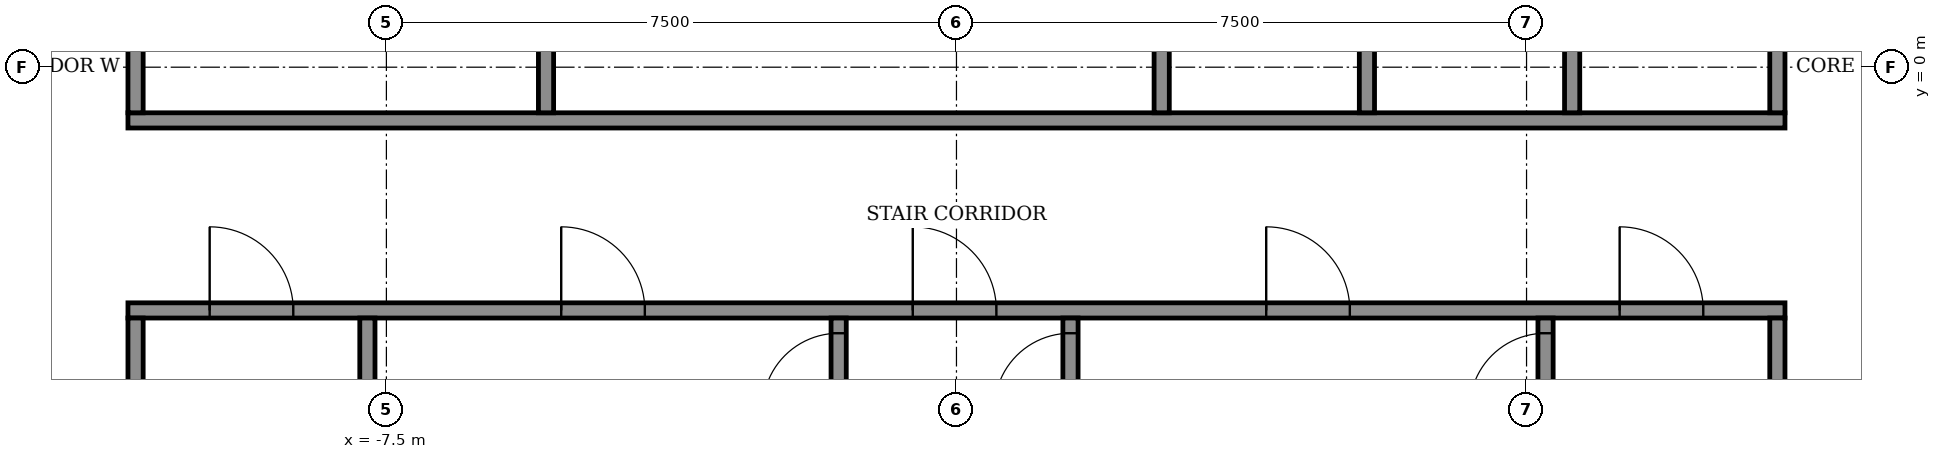
"""IFC4 building model, lengths in metres.
Left out: names, types, materials, properties, quantities, classifications, styles, units other than length and angle.
Written with IfcOpenShell. Run it as: python <this file> out.ifc"""

import sys

from ifc_helpers import new_model, si_unit, direction, frame, frame_2d, origin, place, context, subcontext, project, spatial, rectangle, extrude, element, fill, save


model = new_model("IFC4")
c1 = context("Model", 3, precision=1e-05, world=origin(), true_north=direction((0.0, 1.0)))
c2 = subcontext(c1, "Body", "Model", "MODEL_VIEW")
j1 = project(units=[si_unit("LENGTHUNIT", "METRE"), si_unit("PLANEANGLEUNIT", "RADIAN")], contexts=[c1])
p1 = place(None, origin())
s1 = spatial("IfcSite", under=j1, at=p1, CompositionType="ELEMENT")
p2 = place(p1, origin())
s2 = spatial("IfcBuilding", under=s1, at=p2, CompositionType="ELEMENT")
p3 = place(p2, frame((0.0, 0.0, 182.5)))
s3 = spatial("IfcBuildingStorey", under=s2, at=p3, CompositionType="ELEMENT", Elevation=182.5)
p4 = place(p3, frame((-10.9, -3.2, 0.0), z_axis=(0.0, 0.0, 1.0), x_axis=(1.0, 0.0, 0.0)))
e1 = element("IfcWall", 1, at=p4, inside=s3, PredefinedType="SHEAR", context=c2, shape_type="SweptSolid", body=[
    extrude(rectangle(XDim=21.8, YDim=0.2, at=frame_2d((10.9, 0.0))), origin(), (0.0, 0.0, 1.0), 3.05),
])
p5 = place(p4, frame((1.075, 0.0, 0.0)))
e2 = element("IfcOpeningElement", 2, at=p5, cuts=e1, PredefinedType="OPENING", context=c2, shape_type="SweptSolid", body=[
    extrude(rectangle(XDim=1.1, YDim=2.1, at=frame_2d((0.55, 1.05))), frame((0.0, 0.11, 0.0), z_axis=(0.0, -1.0, 0.0), x_axis=(1.0, 0.0, 0.0)), (0.0, 0.0, 1.0), 0.22),
])
p6 = place(p4, frame((10.325, 0.0, 0.0)))
e3 = element("IfcOpeningElement", 3, at=p6, cuts=e1, PredefinedType="OPENING", context=c2, shape_type="SweptSolid", body=[
    extrude(rectangle(XDim=1.1, YDim=2.1, at=frame_2d((0.55, 1.05))), frame((0.0, 0.11, 0.0), z_axis=(0.0, -1.0, 0.0), x_axis=(1.0, 0.0, 0.0)), (0.0, 0.0, 1.0), 0.22),
])
p7 = place(p4, frame((19.625, 0.0, 0.0)))
e4 = element("IfcOpeningElement", 4, at=p7, cuts=e1, PredefinedType="OPENING", context=c2, shape_type="SweptSolid", body=[
    extrude(rectangle(XDim=1.1, YDim=2.1, at=frame_2d((0.55, 1.05))), frame((0.0, 0.11, 0.0), z_axis=(0.0, -1.0, 0.0), x_axis=(1.0, 0.0, 0.0)), (0.0, 0.0, 1.0), 0.22),
])
p8 = place(p4, frame((5.7, 0.0, 0.0)))
e5 = element("IfcOpeningElement", 5, at=p8, cuts=e1, PredefinedType="OPENING", context=c2, shape_type="SweptSolid", body=[
    extrude(rectangle(XDim=1.1, YDim=2.1, at=frame_2d((0.55, 1.05))), frame((0.0, 0.11, 0.0), z_axis=(0.0, -1.0, 0.0), x_axis=(1.0, 0.0, 0.0)), (0.0, 0.0, 1.0), 0.22),
])
p9 = place(p4, frame((14.975, 0.0, 0.0)))
e6 = element("IfcOpeningElement", 6, at=p9, cuts=e1, PredefinedType="OPENING", context=c2, shape_type="SweptSolid", body=[
    extrude(rectangle(XDim=1.1, YDim=2.1, at=frame_2d((0.55, 1.05))), frame((0.0, 0.11, 0.0), z_axis=(0.0, -1.0, 0.0), x_axis=(1.0, 0.0, 0.0)), (0.0, 0.0, 1.0), 0.22),
])
p10 = place(p3, frame((-10.9, -0.7, 0.0), z_axis=(0.0, 0.0, 1.0), x_axis=(1.0, 0.0, 0.0)))
e7 = element("IfcWall", 7, at=p10, inside=s3, PredefinedType="SHEAR", context=c2, shape_type="SweptSolid", body=[
    extrude(rectangle(XDim=21.8, YDim=0.2, at=frame_2d((10.9, 0.0))), origin(), (0.0, 0.0, 1.0), 3.05),
])
for number, where, z_axis, x_axis in (
    (8, (-10.8, -10.8, 0.0), (0.0, 0.0, 1.0), (0.0, 1.0, 0.0)),
    (9, (-7.75, -10.8, 0.0), (0.0, 0.0, 1.0), (0.0, 1.0, 0.0)),
):
    element("IfcWall", number, at=place(p3, frame(where, z_axis=z_axis, x_axis=x_axis)), inside=s3, PredefinedType="SHEAR", context=c2, shape_type="SweptSolid", body=[
        extrude(rectangle(XDim=7.5, YDim=0.2, at=frame_2d((3.75, 0.0))), origin(), (0.0, 0.0, 1.0), 3.05),
    ])
p11 = place(p3, frame((-1.55, -10.8, 0.0), z_axis=(0.0, 0.0, 1.0), x_axis=(0.0, 1.0, 0.0)))
e10 = element("IfcWall", 10, at=p11, inside=s3, PredefinedType="SHEAR", context=c2, shape_type="SweptSolid", body=[
    extrude(rectangle(XDim=7.5, YDim=0.2, at=frame_2d((3.75, 0.0))), origin(), (0.0, 0.0, 1.0), 3.05),
])
p12 = place(p11, frame((6.3, 0.0, 0.0)))
e11 = element("IfcOpeningElement", 11, at=p12, cuts=e10, PredefinedType="OPENING", context=c2, shape_type="SweptSolid", body=[
    extrude(rectangle(XDim=1.0, YDim=2.1, at=frame_2d((0.5, 1.05))), frame((0.0, 0.11, 0.0), z_axis=(0.0, -1.0, 0.0), x_axis=(1.0, 0.0, 0.0)), (0.0, 0.0, 1.0), 0.22),
])
p13 = place(p3, frame((1.5, -10.8, 0.0), z_axis=(0.0, 0.0, 1.0), x_axis=(0.0, 1.0, 0.0)))
e12 = element("IfcWall", 12, at=p13, inside=s3, PredefinedType="SHEAR", context=c2, shape_type="SweptSolid", body=[
    extrude(rectangle(XDim=7.5, YDim=0.2, at=frame_2d((3.75, 0.0))), origin(), (0.0, 0.0, 1.0), 3.05),
])
p14 = place(p13, frame((6.3, 0.0, 0.0)))
e13 = element("IfcOpeningElement", 13, at=p14, cuts=e12, PredefinedType="OPENING", context=c2, shape_type="SweptSolid", body=[
    extrude(rectangle(XDim=1.0, YDim=2.1, at=frame_2d((0.5, 1.05))), frame((0.0, 0.11, 0.0), z_axis=(0.0, -1.0, 0.0), x_axis=(1.0, 0.0, 0.0)), (0.0, 0.0, 1.0), 0.22),
])
p15 = place(p3, frame((7.75, -10.8, 0.0), z_axis=(0.0, 0.0, 1.0), x_axis=(0.0, 1.0, 0.0)))
e14 = element("IfcWall", 14, at=p15, inside=s3, PredefinedType="SHEAR", context=c2, shape_type="SweptSolid", body=[
    extrude(rectangle(XDim=7.5, YDim=0.2, at=frame_2d((3.75, 0.0))), origin(), (0.0, 0.0, 1.0), 3.05),
])
p16 = place(p15, frame((6.3, 0.0, 0.0)))
e15 = element("IfcOpeningElement", 15, at=p16, cuts=e14, PredefinedType="OPENING", context=c2, shape_type="SweptSolid", body=[
    extrude(rectangle(XDim=1.0, YDim=2.1, at=frame_2d((0.5, 1.05))), frame((0.0, 0.11, 0.0), z_axis=(0.0, -1.0, 0.0), x_axis=(1.0, 0.0, 0.0)), (0.0, 0.0, 1.0), 0.22),
])
p17 = place(p3, frame((10.8, -10.8, 0.0), z_axis=(0.0, 0.0, 1.0), x_axis=(0.0, 1.0, 0.0)))
e16 = element("IfcWall", 16, at=p17, inside=s3, PredefinedType="SHEAR", context=c2, shape_type="SweptSolid", body=[
    extrude(rectangle(XDim=7.5, YDim=0.2, at=frame_2d((3.75, 0.0))), origin(), (0.0, 0.0, 1.0), 3.05),
])
for number, where, z_axis, x_axis in (
    (17, (-10.8, -0.6, 0.0), (0.0, 0.0, 1.0), (0.0, 1.0, 0.0)),
    (18, (-5.4, -0.6, 0.0), (0.0, 0.0, 1.0), (0.0, 1.0, 0.0)),
):
    element("IfcWall", number, at=place(p3, frame(where, z_axis=z_axis, x_axis=x_axis)), inside=s3, PredefinedType="STANDARD", context=c2, shape_type="SweptSolid", body=[
        extrude(rectangle(XDim=2.5, YDim=0.2, at=frame_2d((1.25, 0.0))), origin(), (0.0, 0.0, 1.0), 3.05),
    ])
for number, where, z_axis, x_axis in (
    (19, (2.7, -0.6, 0.0), (0.0, 0.0, 1.0), (0.0, 1.0, 0.0)),
    (20, (5.4, -0.6, 0.0), (0.0, 0.0, 1.0), (0.0, 1.0, 0.0)),
    (21, (8.1, -0.6, 0.0), (0.0, 0.0, 1.0), (0.0, 1.0, 0.0)),
    (22, (10.8, -0.6, 0.0), (0.0, 0.0, 1.0), (0.0, 1.0, 0.0)),
):
    element("IfcWall", number, at=place(p3, frame(where, z_axis=z_axis, x_axis=x_axis)), inside=s3, PredefinedType="SHEAR", context=c2, shape_type="SweptSolid", body=[
        extrude(rectangle(XDim=2.5, YDim=0.2, at=frame_2d((1.25, 0.0))), origin(), (0.0, 0.0, 1.0), 3.05),
    ])
p18 = place(p5, origin())
e23 = element("IfcDoor", 23, at=p18, inside=s3, OperationType="SINGLE_SWING_RIGHT", PredefinedType="DOOR", context=c2, shape_type="SweptSolid", body=[
    extrude(rectangle(XDim=1.1, YDim=2.1, at=frame_2d((0.55, 1.05))), frame((0.0, 0.025, 0.0), z_axis=(0.0, -1.0, 0.0), x_axis=(1.0, 0.0, 0.0)), (0.0, 0.0, 1.0), 0.05),
])
fill(e2, e23)
p19 = place(p6, origin())
e24 = element("IfcDoor", 24, at=p19, inside=s3, OperationType="SINGLE_SWING_RIGHT", PredefinedType="DOOR", context=c2, shape_type="SweptSolid", body=[
    extrude(rectangle(XDim=1.1, YDim=2.1, at=frame_2d((0.55, 1.05))), frame((0.0, 0.025, 0.0), z_axis=(0.0, -1.0, 0.0), x_axis=(1.0, 0.0, 0.0)), (0.0, 0.0, 1.0), 0.05),
])
fill(e3, e24)
p20 = place(p7, origin())
e25 = element("IfcDoor", 25, at=p20, inside=s3, OperationType="SINGLE_SWING_RIGHT", PredefinedType="DOOR", context=c2, shape_type="SweptSolid", body=[
    extrude(rectangle(XDim=1.1, YDim=2.1, at=frame_2d((0.55, 1.05))), frame((0.0, 0.025, 0.0), z_axis=(0.0, -1.0, 0.0), x_axis=(1.0, 0.0, 0.0)), (0.0, 0.0, 1.0), 0.05),
])
fill(e4, e25)
p21 = place(p8, origin())
e26 = element("IfcDoor", 26, at=p21, inside=s3, OperationType="SINGLE_SWING_LEFT", PredefinedType="DOOR", context=c2, shape_type="SweptSolid", body=[
    extrude(rectangle(XDim=1.1, YDim=2.1, at=frame_2d((0.55, 1.05))), frame((0.0, 0.025, 0.0), z_axis=(0.0, -1.0, 0.0), x_axis=(1.0, 0.0, 0.0)), (0.0, 0.0, 1.0), 0.05),
])
fill(e5, e26)
p22 = place(p9, origin())
e27 = element("IfcDoor", 27, at=p22, inside=s3, OperationType="SINGLE_SWING_LEFT", PredefinedType="DOOR", context=c2, shape_type="SweptSolid", body=[
    extrude(rectangle(XDim=1.1, YDim=2.1, at=frame_2d((0.55, 1.05))), frame((0.0, 0.025, 0.0), z_axis=(0.0, -1.0, 0.0), x_axis=(1.0, 0.0, 0.0)), (0.0, 0.0, 1.0), 0.05),
])
fill(e6, e27)
p23 = place(p12, origin())
e28 = element("IfcDoor", 28, at=p23, inside=s3, OperationType="SINGLE_SWING_RIGHT", PredefinedType="DOOR", context=c2, shape_type="SweptSolid", body=[
    extrude(rectangle(XDim=1.0, YDim=2.1, at=frame_2d((0.5, 1.05))), frame((0.0, 0.025, 0.0), z_axis=(0.0, -1.0, 0.0), x_axis=(1.0, 0.0, 0.0)), (0.0, 0.0, 1.0), 0.05),
])
fill(e11, e28)
p24 = place(p14, origin())
e29 = element("IfcDoor", 29, at=p24, inside=s3, OperationType="SINGLE_SWING_RIGHT", PredefinedType="DOOR", context=c2, shape_type="SweptSolid", body=[
    extrude(rectangle(XDim=1.0, YDim=2.1, at=frame_2d((0.5, 1.05))), frame((0.0, 0.025, 0.0), z_axis=(0.0, -1.0, 0.0), x_axis=(1.0, 0.0, 0.0)), (0.0, 0.0, 1.0), 0.05),
])
fill(e13, e29)
p25 = place(p16, origin())
e30 = element("IfcDoor", 30, at=p25, inside=s3, OperationType="SINGLE_SWING_RIGHT", PredefinedType="DOOR", context=c2, shape_type="SweptSolid", body=[
    extrude(rectangle(XDim=1.0, YDim=2.1, at=frame_2d((0.5, 1.05))), frame((0.0, 0.025, 0.0), z_axis=(0.0, -1.0, 0.0), x_axis=(1.0, 0.0, 0.0)), (0.0, 0.0, 1.0), 0.05),
])
fill(e15, e30)
save(model, sys.argv[1])
